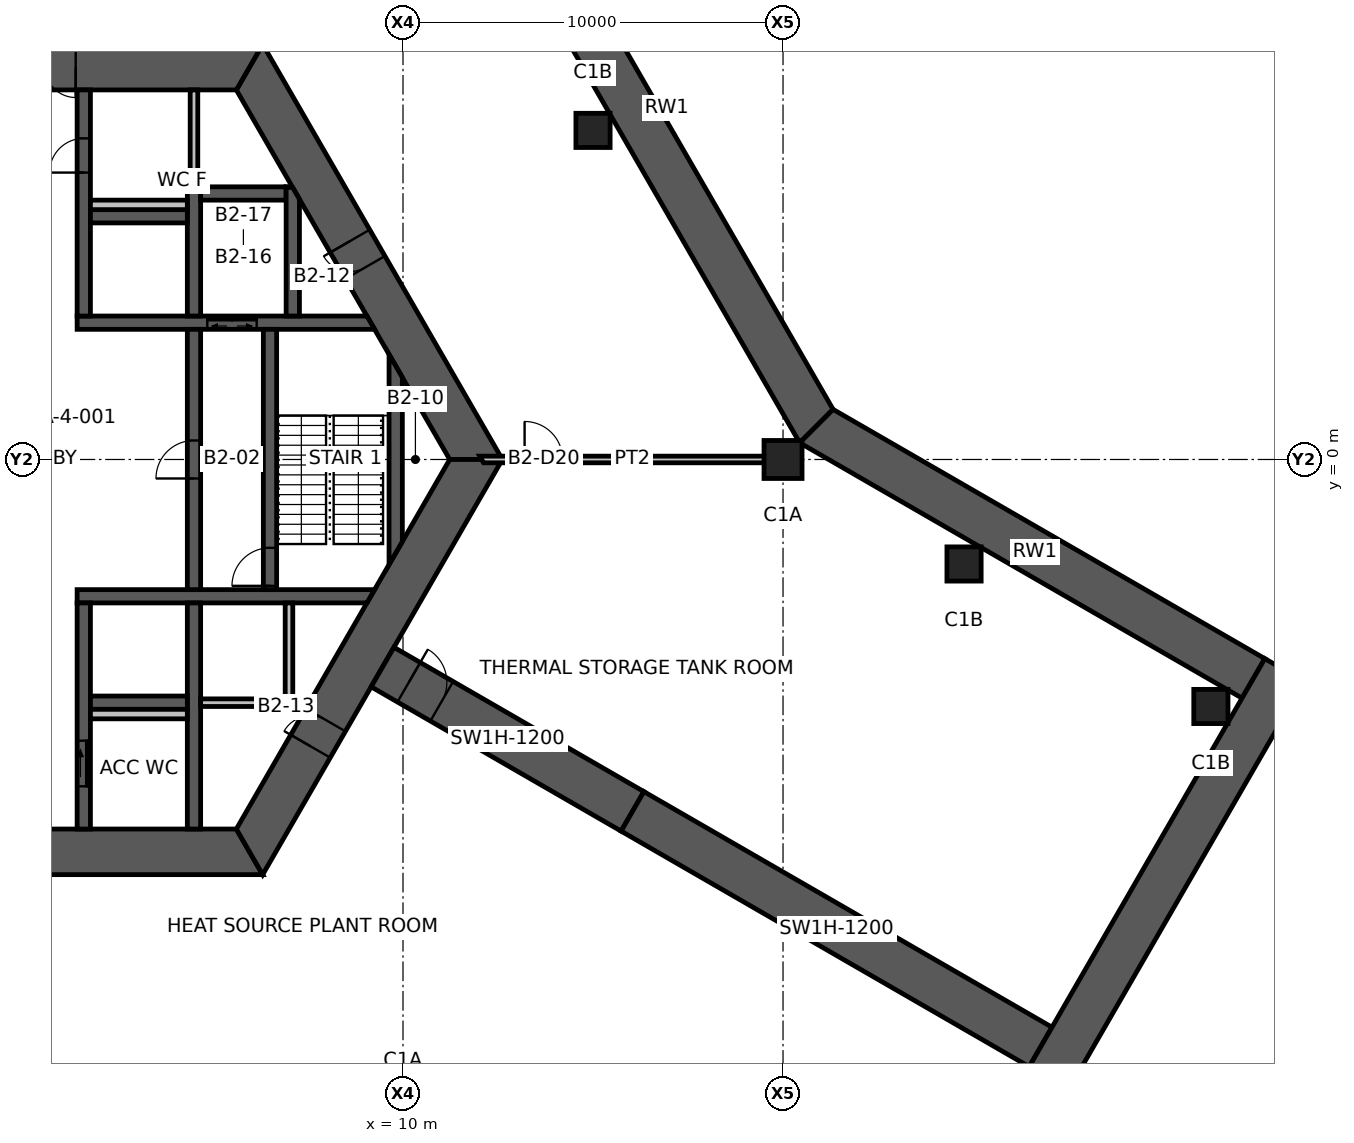
"""IFC4 building model, lengths in metres.
Left out: names, types, materials, properties, quantities, classifications, styles, units other than length and angle.
Written with IfcOpenShell. Run it as: python <this file> out.ifc"""

import sys

from ifc_helpers import new_model, si_unit, direction, frame, frame_2d, origin, origin_2d, place, context, subcontext, project, spatial, polyline, rectangle, hollow_rectangle, outline, extrude, element, fill, save


model = new_model("IFC4")
c1 = context("Model", 3, precision=1e-05, world=origin(), true_north=direction((0.0, 1.0)))
c2 = subcontext(c1, "Body", "Model", "MODEL_VIEW")
j1 = project(units=[si_unit("LENGTHUNIT", "METRE"), si_unit("PLANEANGLEUNIT", "RADIAN")], contexts=[c1])
p1 = place(None, origin())
s1 = spatial("IfcSite", under=j1, at=p1, CompositionType="ELEMENT")
p2 = place(p1, origin())
s2 = spatial("IfcBuilding", under=s1, at=p2, CompositionType="ELEMENT")
p3 = place(p2, frame((0.0, 0.0, -10.0)))
s3 = spatial("IfcBuildingStorey", under=s2, at=p3, CompositionType="ELEMENT", Elevation=-10.0)
p4 = place(p3, frame((20.0, 0.0, -1.2), z_axis=(0.0, 0.0, 1.0), x_axis=(1.0, 0.0, 0.0)))
e1 = element("IfcColumn", 1, at=p4, inside=s3, PredefinedType="COLUMN", context=c2, shape_type="SweptSolid", body=[
    extrude(hollow_rectangle(XDim=1.0, YDim=1.0, WallThickness=0.06, at=origin_2d()), origin(), (0.0, 0.0, 1.0), 6.2),
])
for number, where, z_axis, x_axis in (
    (2, (15.0, 8.66, -1.2), (0.0, 0.0, 1.0), (1.0, 0.0, 0.0)),
    (3, (24.763, -2.75, -1.2), (0.0, 0.0, 1.0), (1.0, 0.0, 0.0)),
    (4, (31.258, -6.5, -1.2), (0.0, 0.0, 1.0), (1.0, 0.0, 0.0)),
):
    element("IfcColumn", number, at=place(p3, frame(where, z_axis=z_axis, x_axis=x_axis)), inside=s3, PredefinedType="COLUMN", context=c2, shape_type="SweptSolid", body=[
        extrude(hollow_rectangle(XDim=0.9, YDim=0.9, WallThickness=0.05, at=origin_2d()), origin(), (0.0, 0.0, 1.0), 6.2),
    ])
p5 = place(p3, frame((11.922, 0.0, 0.0), z_axis=(0.0, 0.0, 1.0), x_axis=(-0.500004296715, 0.866022923061, 0.0)))
e5 = element("IfcWall", 5, at=p5, inside=s3, PredefinedType="SHEAR", context=c2, shape_type="SweptSolid", body=[
    extrude(outline(polyline([(-0.346, -0.6), (5.835, -0.6), (6.635, -0.6), (12.269, -0.6), (11.576, 0.6), (6.635, 0.6), (5.835, 0.6), (0.346, 0.6), (-0.346, -0.6)])), origin(), (0.0, 0.0, 1.0), 5.0),
])
p6 = place(p5, frame((5.835, 0.0, 0.0)))
e6 = element("IfcOpeningElement", 6, at=p6, cuts=e5, PredefinedType="OPENING", context=c2, shape_type="SweptSolid", body=[
    extrude(rectangle(XDim=0.8, YDim=2.1, at=frame_2d((0.4, 1.05))), frame((0.0, 0.61, 0.0), z_axis=(0.0, -1.0, 0.0), x_axis=(1.0, 0.0, 0.0)), (0.0, 0.0, 1.0), 1.22),
])
p7 = place(p3, frame((5.961, 10.325, 0.0), z_axis=(0.0, 0.0, 1.0), x_axis=(-1.0, 0.0, 0.0)))
e7 = element("IfcWall", 7, at=p7, inside=s3, PredefinedType="SHEAR", context=c2, shape_type="SweptSolid", body=[
    extrude(outline(polyline([(-0.346, -0.6), (4.574, -0.6), (5.374, -0.6), (6.549, -0.6), (7.349, -0.6), (12.269, -0.6), (11.576, 0.6), (7.349, 0.6), (6.549, 0.6), (5.374, 0.6), (4.574, 0.6), (0.346, 0.6), (-0.346, -0.6)])), origin(), (0.0, 0.0, 1.0), 5.0),
])
p8 = place(p7, frame((6.549, 0.0, 0.0)))
e8 = element("IfcOpeningElement", 8, at=p8, cuts=e7, PredefinedType="OPENING", context=c2, shape_type="SweptSolid", body=[
    extrude(rectangle(XDim=0.8, YDim=2.1, at=frame_2d((0.4, 1.05))), frame((0.0, 0.61, 0.0), z_axis=(0.0, -1.0, 0.0), x_axis=(1.0, 0.0, 0.0)), (0.0, 0.0, 1.0), 1.22),
])
p9 = place(p7, frame((4.574, 0.0, 0.0)))
e9 = element("IfcOpeningElement", 9, at=p9, cuts=e7, PredefinedType="OPENING", context=c2, shape_type="SweptSolid", body=[
    extrude(rectangle(XDim=0.8, YDim=2.1, at=frame_2d((0.4, 1.05))), frame((0.0, 0.61, 0.0), z_axis=(0.0, -1.0, 0.0), x_axis=(1.0, 0.0, 0.0)), (0.0, 0.0, 1.0), 1.22),
])
p10 = place(p3, frame((-5.961, -10.325, 0.0), z_axis=(0.0, 0.0, 1.0), x_axis=(1.0, 0.0, 0.0)))
e10 = element("IfcWall", 10, at=p10, inside=s3, PredefinedType="SHEAR", context=c2, shape_type="SweptSolid", body=[
    extrude(outline(polyline([(-0.346, -0.6), (5.461, -0.6), (6.461, -0.6), (12.269, -0.6), (11.576, 0.6), (6.461, 0.6), (5.461, 0.6), (0.346, 0.6), (-0.346, -0.6)])), origin(), (0.0, 0.0, 1.0), 5.0),
])
p11 = place(p10, frame((5.461, 0.0, 0.0)))
e11 = element("IfcOpeningElement", 11, at=p11, cuts=e10, PredefinedType="OPENING", context=c2, shape_type="SweptSolid", body=[
    extrude(rectangle(XDim=1.0, YDim=2.1, at=frame_2d((0.5, 1.05))), frame((0.0, 0.61, 0.0), z_axis=(0.0, -1.0, 0.0), x_axis=(1.0, 0.0, 0.0)), (0.0, 0.0, 1.0), 1.22),
])
p12 = place(p3, frame((5.961, -10.325, 0.0), z_axis=(0.0, 0.0, 1.0), x_axis=(0.500004296715, 0.866022923061, 0.0)))
e12 = element("IfcWall", 12, at=p12, inside=s3, PredefinedType="SHEAR", context=c2, shape_type="SweptSolid", body=[
    extrude(outline(polyline([(-0.346, -0.6), (3.208, -0.6), (4.009, -0.6), (12.269, -0.6), (11.576, 0.6), (4.009, 0.6), (3.208, 0.6), (0.346, 0.6), (-0.346, -0.6)])), origin(), (0.0, 0.0, 1.0), 5.0),
])
p13 = place(p12, frame((3.208, 0.0, 0.0)))
e13 = element("IfcOpeningElement", 13, at=p13, cuts=e12, PredefinedType="OPENING", context=c2, shape_type="SweptSolid", body=[
    extrude(rectangle(XDim=0.8, YDim=2.1, at=frame_2d((0.4, 1.05))), frame((0.0, 0.61, 0.0), z_axis=(0.0, -1.0, 0.0), x_axis=(1.0, 0.0, 0.0)), (0.0, 0.0, 1.0), 1.22),
])
p14 = place(p3, frame((9.461, -5.462, 0.0), z_axis=(0.0, 0.0, 1.0), x_axis=(0.866019116917, -0.500010889016, 0.0)))
e14 = element("IfcWall", 14, at=p14, inside=s3, PredefinedType="SHEAR", context=c2, shape_type="SweptSolid", body=[
    extrude(rectangle(XDim=7.595, YDim=1.2, at=frame_2d((3.798, 0.0))), origin(), (0.0, 0.0, 1.0), 5.0),
])
p15 = place(p14, frame((0.8, 0.0, 0.0)))
e15 = element("IfcOpeningElement", 15, at=p15, cuts=e14, PredefinedType="OPENING", context=c2, shape_type="SweptSolid", body=[
    extrude(rectangle(XDim=1.0, YDim=2.1, at=frame_2d((0.5, 1.05))), frame((0.0, 0.61, 0.0), z_axis=(0.0, -1.0, 0.0), x_axis=(1.0, 0.0, 0.0)), (0.0, 0.0, 1.0), 1.22),
])
p16 = place(p3, frame((16.039, -9.26, 0.0), z_axis=(0.0, 0.0, 1.0), x_axis=(0.866023285932, -0.50000366821, 0.0)))
e16 = element("IfcWall", 16, at=p16, inside=s3, PredefinedType="SHEAR", context=c2, shape_type="SweptSolid", body=[
    extrude(rectangle(XDim=12.4, YDim=1.2, at=frame_2d((6.2, 0.0))), origin(), (0.0, 0.0, 1.0), 5.0),
])
p17 = place(p3, frame((11.2, 17.642, 0.0), z_axis=(0.0, 0.0, 1.0), x_axis=(0.499998307868, -0.866026380735, 0.0)))
e17 = element("IfcWall", 17, at=p17, inside=s3, PredefinedType="SOLIDWALL", context=c2, shape_type="SweptSolid", body=[
    extrude(outline(polyline([(-0.161, -0.6), (19.518, -0.6), (19.196, 0.6), (0.161, 0.6), (-0.161, -0.6)])), origin(), (0.0, 0.0, 1.0), 5.0),
])
p18 = place(p3, frame((20.878, 0.878, 0.0), z_axis=(0.0, 0.0, 1.0), x_axis=(0.866028209229, -0.499995140796, 0.0)))
e18 = element("IfcWall", 18, at=p18, inside=s3, PredefinedType="SOLIDWALL", context=c2, shape_type="SweptSolid", body=[
    extrude(outline(polyline([(-0.161, -0.6), (13.279, -0.6), (13.279, 0.6), (0.161, 0.6), (-0.161, -0.6)])), origin(), (0.0, 0.0, 1.0), 5.0),
])
p19 = place(p3, frame((33.198, -5.541, 0.0), z_axis=(0.0, 0.0, 1.0), x_axis=(-0.500005427746, -0.866022270051, 0.0)))
e19 = element("IfcWall", 19, at=p19, inside=s3, PredefinedType="SOLIDWALL", context=c2, shape_type="SweptSolid", body=[
    extrude(rectangle(XDim=23.6, YDim=1.2, at=frame_2d((11.8, 0.0))), origin(), (0.0, 0.0, 1.0), 5.0),
])
p20 = place(p3, frame((1.425, 3.6, 0.0), z_axis=(0.0, 0.0, 1.0), x_axis=(1.0, 0.0, 0.0)))
e20 = element("IfcWall", 20, at=p20, inside=s3, PredefinedType="SHEAR", context=c2, shape_type="SweptSolid", body=[
    extrude(outline(polyline([(0.0, -0.175), (3.425, -0.175), (4.725, -0.175), (7.827, -0.175), (7.625, 0.175), (4.725, 0.175), (3.425, 0.175), (0.0, 0.175), (0.0, -0.175)])), origin(), (0.0, 0.0, 1.0), 5.0),
])
p21 = place(p20, frame((3.425, 0.0, 0.0)))
e21 = element("IfcOpeningElement", 21, at=p21, cuts=e20, PredefinedType="OPENING", context=c2, shape_type="SweptSolid", body=[
    extrude(rectangle(XDim=1.3, YDim=2.1, at=frame_2d((0.65, 1.05))), frame((0.0, 0.185, 0.0), z_axis=(0.0, -1.0, 0.0), x_axis=(1.0, 0.0, 0.0)), (0.0, 0.0, 1.0), 0.37),
])
p22 = place(p3, frame((1.425, -3.6, 0.0), z_axis=(0.0, 0.0, 1.0), x_axis=(1.0, 0.0, 0.0)))
e22 = element("IfcWall", 22, at=p22, inside=s3, PredefinedType="SHEAR", context=c2, shape_type="SweptSolid", body=[
    extrude(outline(polyline([(0.0, -0.175), (7.625, -0.175), (7.827, 0.175), (0.0, 0.175), (0.0, -0.175)])), origin(), (0.0, 0.0, 1.0), 5.0),
])
p23 = place(p3, frame((1.6, 3.775, 0.0), z_axis=(0.0, 0.0, 1.0), x_axis=(0.0, 1.0, 0.0)))
e23 = element("IfcWall", 23, at=p23, inside=s3, PredefinedType="SHEAR", context=c2, shape_type="SweptSolid", body=[
    extrude(rectangle(XDim=5.95, YDim=0.35, at=frame_2d((2.975, 0.0))), origin(), (0.0, 0.0, 1.0), 5.0),
])
p24 = place(p23, frame((3.775, 0.0, 0.0)))
e24 = element("IfcOpeningElement", 24, at=p24, cuts=e23, PredefinedType="OPENING", context=c2, shape_type="SweptSolid", body=[
    extrude(rectangle(XDim=0.9, YDim=2.1, at=frame_2d((0.45, 1.05))), frame((0.0, 0.185, 0.0), z_axis=(0.0, -1.0, 0.0), x_axis=(1.0, 0.0, 0.0)), (0.0, 0.0, 1.0), 0.37),
])
p25 = place(p3, frame((1.6, -3.775, 0.0), z_axis=(0.0, 0.0, 1.0), x_axis=(0.0, -1.0, 0.0)))
e25 = element("IfcWall", 25, at=p25, inside=s3, PredefinedType="SHEAR", context=c2, shape_type="SweptSolid", body=[
    extrude(rectangle(XDim=5.95, YDim=0.35, at=frame_2d((2.975, 0.0))), origin(), (0.0, 0.0, 1.0), 5.0),
])
p26 = place(p25, frame((3.625, 0.0, 0.0)))
e26 = element("IfcOpeningElement", 26, at=p26, cuts=e25, PredefinedType="OPENING", context=c2, shape_type="SweptSolid", body=[
    extrude(rectangle(XDim=1.2, YDim=2.1, at=frame_2d((0.6, 1.05))), frame((0.0, 0.185, 0.0), z_axis=(0.0, -1.0, 0.0), x_axis=(1.0, 0.0, 0.0)), (0.0, 0.0, 1.0), 0.37),
])
p27 = place(p3, frame((4.5, -3.425, 0.0), z_axis=(0.0, 0.0, 1.0), x_axis=(0.0, 1.0, 0.0)))
e27 = element("IfcWall", 27, at=p27, inside=s3, PredefinedType="SHEAR", context=c2, shape_type="SweptSolid", body=[
    extrude(rectangle(XDim=6.85, YDim=0.35, at=frame_2d((3.425, 0.0))), origin(), (0.0, 0.0, 1.0), 5.0),
])
p28 = place(p27, frame((2.925, 0.0, 0.0)))
e28 = element("IfcOpeningElement", 28, at=p28, cuts=e27, PredefinedType="OPENING", context=c2, shape_type="SweptSolid", body=[
    extrude(rectangle(XDim=1.0, YDim=2.1, at=frame_2d((0.5, 1.05))), frame((0.0, 0.185, 0.0), z_axis=(0.0, -1.0, 0.0), x_axis=(1.0, 0.0, 0.0)), (0.0, 0.0, 1.0), 0.37),
])
p29 = place(p3, frame((6.5, -3.425, 0.0), z_axis=(0.0, 0.0, 1.0), x_axis=(0.0, 1.0, 0.0)))
e29 = element("IfcWall", 29, at=p29, inside=s3, PredefinedType="SHEAR", context=c2, shape_type="SweptSolid", body=[
    extrude(rectangle(XDim=6.85, YDim=0.35, at=frame_2d((3.425, 0.0))), origin(), (0.0, 0.0, 1.0), 5.0),
])
p30 = place(p29, frame((0.1, 0.0, 0.0)))
e30 = element("IfcOpeningElement", 30, at=p30, cuts=e29, PredefinedType="OPENING", context=c2, shape_type="SweptSolid", body=[
    extrude(rectangle(XDim=1.0, YDim=2.1, at=frame_2d((0.5, 1.05))), frame((0.0, 0.185, 0.0), z_axis=(0.0, -1.0, 0.0), x_axis=(1.0, 0.0, 0.0)), (0.0, 0.0, 1.0), 0.37),
])
p31 = place(p3, frame((4.5, 3.775, 0.0), z_axis=(0.0, 0.0, 1.0), x_axis=(0.0, 1.0, 0.0)))
e31 = element("IfcWall", 31, at=p31, inside=s3, PredefinedType="SHEAR", context=c2, shape_type="SweptSolid", body=[
    extrude(rectangle(XDim=3.4, YDim=0.35, at=frame_2d((1.7, 0.0))), origin(), (0.0, 0.0, 1.0), 5.0),
])
p32 = place(p3, frame((4.5, -3.775, 0.0), z_axis=(0.0, 0.0, 1.0), x_axis=(0.0, -1.0, 0.0)))
e32 = element("IfcWall", 32, at=p32, inside=s3, PredefinedType="SHEAR", context=c2, shape_type="SweptSolid", body=[
    extrude(rectangle(XDim=5.95, YDim=0.35, at=frame_2d((2.975, 0.0))), origin(), (0.0, 0.0, 1.0), 5.0),
])
for number, where, z_axis, x_axis in (
    (33, (1.775, 6.4, 0.0), (0.0, 0.0, 1.0), (1.0, 0.0, 0.0)),
    (34, (1.775, -6.4, 0.0), (0.0, 0.0, 1.0), (1.0, 0.0, 0.0)),
):
    element("IfcWall", number, at=place(p3, frame(where, z_axis=z_axis, x_axis=x_axis)), inside=s3, PredefinedType="SHEAR", context=c2, shape_type="SweptSolid", body=[
        extrude(rectangle(XDim=2.55, YDim=0.35, at=frame_2d((1.275, 0.0))), origin(), (0.0, 0.0, 1.0), 5.0),
    ])
p33 = place(p3, frame((4.675, 7.0, 0.0), z_axis=(0.0, 0.0, 1.0), x_axis=(1.0, 0.0, 0.0)))
e35 = element("IfcWall", 35, at=p33, inside=s3, PredefinedType="SHEAR", context=c2, shape_type="SweptSolid", body=[
    extrude(rectangle(XDim=2.25, YDim=0.35, at=frame_2d((1.125, 0.0))), origin(), (0.0, 0.0, 1.0), 5.0),
])
p34 = place(p3, frame((7.1, 3.775, 0.0), z_axis=(0.0, 0.0, 1.0), x_axis=(0.0, 1.0, 0.0)))
e36 = element("IfcWall", 36, at=p34, inside=s3, PredefinedType="SHEAR", context=c2, shape_type="SweptSolid", body=[
    extrude(outline(polyline([(0.0, -0.175), (3.074, -0.175), (3.377, 0.0), (3.4, 0.175), (0.0, 0.175), (0.0, -0.175)])), origin(), (0.0, 0.0, 1.0), 5.0),
])
p35 = place(p3, frame((9.808, -2.462, 0.0), z_axis=(0.0, 0.0, 1.0), x_axis=(0.0, 1.0, 0.0)))
e37 = element("IfcWall", 37, at=p35, inside=s3, PredefinedType="SHEAR", context=c2, shape_type="SweptSolid", body=[
    extrude(outline(polyline([(0.303, -0.175), (4.621, -0.175), (5.228, 0.175), (-0.303, 0.175), (0.303, -0.175)])), origin(), (0.0, 0.0, 1.0), 5.0),
])
p36 = place(p3, frame((4.5, 7.175, 0.0), z_axis=(0.0, 0.0, 1.0), x_axis=(0.0, 1.0, 0.0)))
e38 = element("IfcWall", 38, at=p36, inside=s3, PredefinedType="STANDARD", context=c2, shape_type="SweptSolid", body=[
    extrude(rectangle(XDim=2.55, YDim=0.2, at=frame_2d((1.275, 0.0))), origin(), (0.0, 0.0, 1.0), 5.0),
])
p37 = place(p3, frame((4.675, -6.4, 0.0), z_axis=(0.0, 0.0, 1.0), x_axis=(1.0, 0.0, 0.0)))
e39 = element("IfcWall", 39, at=p37, inside=s3, PredefinedType="STANDARD", context=c2, shape_type="SweptSolid", body=[
    extrude(rectangle(XDim=2.425, YDim=0.2, at=frame_2d((1.212, 0.0))), origin(), (0.0, 0.0, 1.0), 5.0),
])
p38 = place(p3, frame((7.0, -3.775, 0.0), z_axis=(0.0, 0.0, 1.0), x_axis=(0.0, -1.0, 0.0)))
e40 = element("IfcWall", 40, at=p38, inside=s3, PredefinedType="STANDARD", context=c2, shape_type="SweptSolid", body=[
    extrude(rectangle(XDim=2.525, YDim=0.2, at=frame_2d((1.263, 0.0))), origin(), (0.0, 0.0, 1.0), 5.0),
])
for number, where, z_axis, x_axis in (
    (41, (1.775, 6.7, 0.0), (0.0, 0.0, 1.0), (1.0, 0.0, 0.0)),
    (42, (1.775, -6.7, 0.0), (0.0, 0.0, 1.0), (1.0, 0.0, 0.0)),
):
    element("IfcWall", number, at=place(p3, frame(where, z_axis=z_axis, x_axis=x_axis)), inside=s3, PredefinedType="PLUMBINGWALL", context=c2, shape_type="SweptSolid", body=[
        extrude(rectangle(XDim=2.55, YDim=0.25, at=frame_2d((1.275, 0.0))), origin(), (0.0, 0.0, 1.0), 5.0),
    ])
p39 = place(p3, frame((12.07, 0.0, 0.0), z_axis=(0.0, 0.0, 1.0), x_axis=(1.0, 0.0, 0.0)))
e43 = element("IfcWall", 43, at=p39, inside=s3, PredefinedType="PARTITIONING", context=c2, shape_type="SweptSolid", body=[
    extrude(outline(polyline([(0.051, -0.087), (1.129, -0.087), (2.129, -0.087), (7.93, -0.087), (7.93, 0.087), (2.129, 0.087), (1.129, 0.087), (-0.051, 0.087), (0.051, -0.087)])), origin(), (0.0, 0.0, 1.0), 3.85),
])
p40 = place(p39, frame((1.129, 0.0, 0.0)))
e44 = element("IfcOpeningElement", 44, at=p40, cuts=e43, PredefinedType="OPENING", context=c2, shape_type="SweptSolid", body=[
    extrude(rectangle(XDim=1.0, YDim=2.1, at=frame_2d((0.5, 1.05))), frame((0.0, 0.098, 0.0), z_axis=(0.0, -1.0, 0.0), x_axis=(1.0, 0.0, 0.0)), (0.0, 0.0, 1.0), 0.195),
])
p41 = place(p9, origin())
e45 = element("IfcDoor", 45, at=p41, inside=s3, OperationType="SINGLE_SWING_LEFT", PredefinedType="DOOR", context=c2, shape_type="SweptSolid", body=[
    extrude(rectangle(XDim=0.8, YDim=2.1, at=frame_2d((0.4, 1.05))), frame((0.0, 0.025, 0.0), z_axis=(0.0, -1.0, 0.0), x_axis=(1.0, 0.0, 0.0)), (0.0, 0.0, 1.0), 0.05),
])
fill(e9, e45)
p42 = place(p6, origin())
e46 = element("IfcDoor", 46, at=p42, inside=s3, OperationType="SINGLE_SWING_RIGHT", PredefinedType="DOOR", context=c2, shape_type="SweptSolid", body=[
    extrude(rectangle(XDim=0.8, YDim=2.1, at=frame_2d((0.4, 1.05))), frame((0.0, 0.025, 0.0), z_axis=(0.0, -1.0, 0.0), x_axis=(1.0, 0.0, 0.0)), (0.0, 0.0, 1.0), 0.05),
])
fill(e6, e46)
p43 = place(p13, origin())
e47 = element("IfcDoor", 47, at=p43, inside=s3, OperationType="SINGLE_SWING_LEFT", PredefinedType="DOOR", context=c2, shape_type="SweptSolid", body=[
    extrude(rectangle(XDim=0.8, YDim=2.1, at=frame_2d((0.4, 1.05))), frame((0.0, 0.025, 0.0), z_axis=(0.0, -1.0, 0.0), x_axis=(1.0, 0.0, 0.0)), (0.0, 0.0, 1.0), 0.05),
])
fill(e13, e47)
p44 = place(p28, origin())
e48 = element("IfcDoor", 48, at=p44, inside=s3, OperationType="SINGLE_SWING_LEFT", PredefinedType="DOOR", context=c2, shape_type="SweptSolid", body=[
    extrude(rectangle(XDim=1.0, YDim=2.1, at=frame_2d((0.5, 1.05))), frame((0.0, 0.025, 0.0), z_axis=(0.0, -1.0, 0.0), x_axis=(1.0, 0.0, 0.0)), (0.0, 0.0, 1.0), 0.05),
])
fill(e28, e48)
p45 = place(p30, origin())
e49 = element("IfcDoor", 49, at=p45, inside=s3, OperationType="SINGLE_SWING_LEFT", PredefinedType="DOOR", context=c2, shape_type="SweptSolid", body=[
    extrude(rectangle(XDim=1.0, YDim=2.1, at=frame_2d((0.5, 1.05))), frame((0.0, 0.025, 0.0), z_axis=(0.0, -1.0, 0.0), x_axis=(1.0, 0.0, 0.0)), (0.0, 0.0, 1.0), 0.05),
])
fill(e30, e49)
p46 = place(p24, origin())
e50 = element("IfcDoor", 50, at=p46, inside=s3, OperationType="SINGLE_SWING_LEFT", PredefinedType="DOOR", context=c2, shape_type="SweptSolid", body=[
    extrude(rectangle(XDim=0.9, YDim=2.1, at=frame_2d((0.45, 1.05))), frame((0.0, 0.025, 0.0), z_axis=(0.0, -1.0, 0.0), x_axis=(1.0, 0.0, 0.0)), (0.0, 0.0, 1.0), 0.05),
])
fill(e24, e50)
p47 = place(p26, origin())
e51 = element("IfcDoor", 51, at=p47, inside=s3, OperationType="SLIDING_TO_LEFT", PredefinedType="DOOR", context=c2, shape_type="SweptSolid", body=[
    extrude(rectangle(XDim=1.2, YDim=2.1, at=frame_2d((0.6, 1.05))), frame((0.0, 0.025, 0.0), z_axis=(0.0, -1.0, 0.0), x_axis=(1.0, 0.0, 0.0)), (0.0, 0.0, 1.0), 0.05),
])
fill(e26, e51)
p48 = place(p15, origin())
e52 = element("IfcDoor", 52, at=p48, inside=s3, OperationType="SINGLE_SWING_LEFT", PredefinedType="DOOR", context=c2, shape_type="SweptSolid", body=[
    extrude(rectangle(XDim=1.0, YDim=2.1, at=frame_2d((0.5, 1.05))), frame((0.0, 0.025, 0.0), z_axis=(0.0, -1.0, 0.0), x_axis=(1.0, 0.0, 0.0)), (0.0, 0.0, 1.0), 0.05),
])
fill(e15, e52)
p49 = place(p40, origin())
e53 = element("IfcDoor", 53, at=p49, inside=s3, OperationType="SINGLE_SWING_LEFT", PredefinedType="DOOR", context=c2, shape_type="SweptSolid", body=[
    extrude(rectangle(XDim=1.0, YDim=2.1, at=frame_2d((0.5, 1.05))), frame((0.0, 0.025, 0.0), z_axis=(0.0, -1.0, 0.0), x_axis=(1.0, 0.0, 0.0)), (0.0, 0.0, 1.0), 0.05),
])
fill(e44, e53)
p50 = place(p21, origin())
e54 = element("IfcDoor", 54, at=p50, inside=s3, OperationType="DOUBLE_DOOR_SLIDING", PredefinedType="DOOR", context=c2, shape_type="SweptSolid", body=[
    extrude(rectangle(XDim=1.3, YDim=2.1, at=frame_2d((0.65, 1.05))), frame((0.0, 0.025, 0.0), z_axis=(0.0, -1.0, 0.0), x_axis=(1.0, 0.0, 0.0)), (0.0, 0.0, 1.0), 0.05),
])
fill(e21, e54)
save(model, sys.argv[1])
